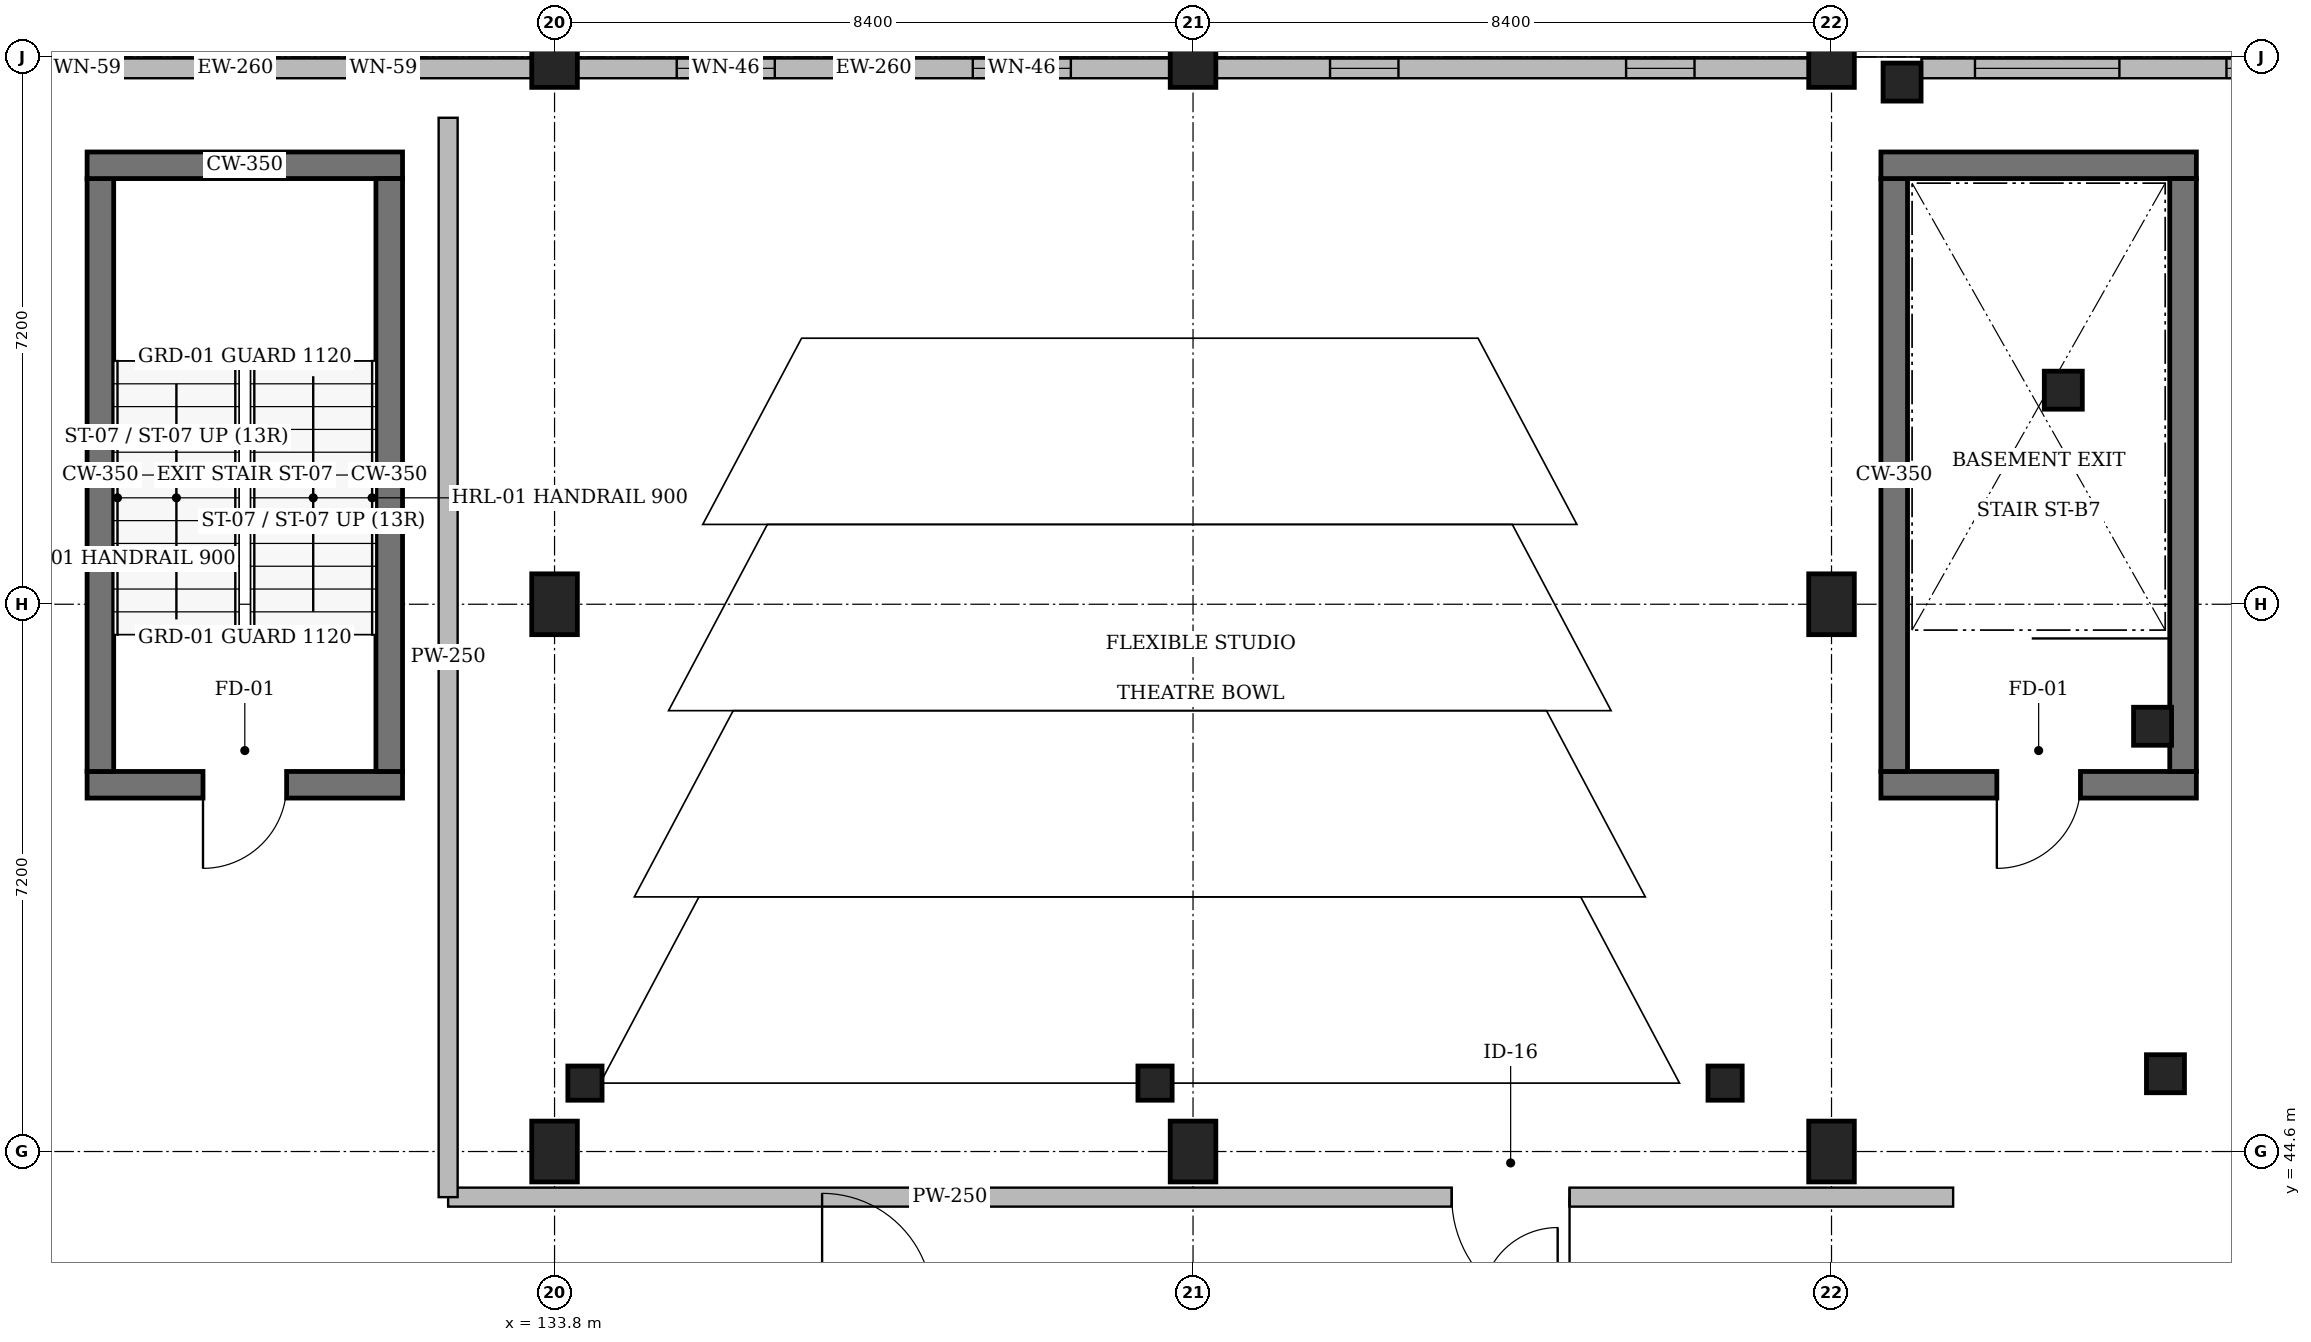
"""IFC4 building model, lengths in metres.
Left out: names, types, materials, properties, quantities, classifications, styles, units other than length and angle.
Written with IfcOpenShell. Run it as: python <this file> out.ifc"""

import sys

from ifc_helpers import new_model, si_unit, direction, frame, frame_2d, origin, origin_2d, place, context, subcontext, project, spatial, rectangle, extrude, element, fill, save


model = new_model("IFC4")
c1 = context("Model", 3, precision=1e-05, world=origin(), true_north=direction((0.0, 1.0)))
c2 = subcontext(c1, "Body", "Model", "MODEL_VIEW")
j1 = project(units=[si_unit("LENGTHUNIT", "METRE"), si_unit("PLANEANGLEUNIT", "RADIAN")], contexts=[c1])
p1 = place(None, origin())
s1 = spatial("IfcSite", under=j1, at=p1, CompositionType="ELEMENT")
p2 = place(p1, origin())
s2 = spatial("IfcBuilding", under=s1, at=p2, CompositionType="ELEMENT")
p3 = place(p2, origin())
s3 = spatial("IfcBuildingStorey", under=s2, at=p3, CompositionType="ELEMENT", Elevation=0.0)
for number, where, z_axis, x_axis in (
    (1, (133.8, 44.6, 0.0), (0.0, 0.0, 1.0), (1.0, 0.0, 0.0)),
    (2, (133.8, 51.8, 0.0), (0.0, 0.0, 1.0), (1.0, 0.0, 0.0)),
    (3, (133.8, 59.0, 0.0), (0.0, 0.0, 1.0), (1.0, 0.0, 0.0)),
    (4, (142.2, 44.6, 0.0), (0.0, 0.0, 1.0), (1.0, 0.0, 0.0)),
    (5, (142.2, 59.0, 0.0), (0.0, 0.0, 1.0), (1.0, 0.0, 0.0)),
    (6, (150.6, 44.6, 0.0), (0.0, 0.0, 1.0), (1.0, 0.0, 0.0)),
    (7, (150.6, 51.8, 0.0), (0.0, 0.0, 1.0), (1.0, 0.0, 0.0)),
    (8, (150.6, 59.0, 0.0), (0.0, 0.0, 1.0), (1.0, 0.0, 0.0)),
):
    element("IfcColumn", number, at=place(p3, frame(where, z_axis=z_axis, x_axis=x_axis)), inside=s3, PredefinedType="COLUMN", context=c2, shape_type="SweptSolid", body=[
        extrude(rectangle(XDim=0.6, YDim=0.8, at=origin_2d()), origin(), (0.0, 0.0, 1.0), 4.8),
    ])
for number, where, z_axis, x_axis in (
    (9, (134.2, 45.5, 0.0), (0.0, 0.0, 1.0), (1.0, 0.0, 0.0)),
    (10, (141.7, 45.5, 0.0), (0.0, 0.0, 1.0), (1.0, 0.0, 0.0)),
    (11, (149.2, 45.5, 0.0), (0.0, 0.0, 1.0), (1.0, 0.0, 0.0)),
):
    element("IfcColumn", number, at=place(p3, frame(where, z_axis=z_axis, x_axis=x_axis)), inside=s3, PredefinedType="COLUMN", context=c2, shape_type="SweptSolid", body=[
        extrude(rectangle(XDim=0.45, YDim=0.45, at=origin_2d()), origin(), (0.0, 0.0, 1.0), 0.7),
    ])
for number, where, z_axis, x_axis in (
    (12, (151.528, 58.669, 0.0), (0.0, 0.0, 1.0), (1.0, 0.0, 0.0)),
    (13, (153.649, 54.616, 0.0), (0.0, 0.0, 1.0), (1.0, 0.0, 0.0)),
    (14, (154.824, 50.195, 0.0), (0.0, 0.0, 1.0), (1.0, 0.0, 0.0)),
    (15, (154.993, 45.623, 0.0), (0.0, 0.0, 1.0), (1.0, 0.0, 0.0)),
):
    element("IfcColumn", number, at=place(p3, frame(where, z_axis=z_axis, x_axis=x_axis)), inside=s3, PredefinedType="COLUMN", context=c2, shape_type="SweptSolid", body=[
        extrude(rectangle(XDim=0.5, YDim=0.5, at=origin_2d()), origin(), (0.0, 0.0, 1.0), 4.8),
    ])
p4 = place(p3, frame((131.8, 49.425, 0.0), z_axis=(0.0, 0.0, 1.0), x_axis=(-1.0, 0.0, 0.0)))
e16 = element("IfcWall", 16, at=p4, inside=s3, PredefinedType="SOLIDWALL", context=c2, shape_type="SweptSolid", body=[
    extrude(rectangle(XDim=4.15, YDim=0.35, at=frame_2d((2.075, 0.0))), origin(), (0.0, 0.0, 1.0), 4.8),
])
p5 = place(p4, frame((1.525, 0.0, 0.0)))
e17 = element("IfcOpeningElement", 17, at=p5, cuts=e16, PredefinedType="OPENING", context=c2, shape_type="SweptSolid", body=[
    extrude(rectangle(XDim=1.1, YDim=2.15, at=frame_2d((0.55, 1.075))), frame((0.0, 0.195, 0.0), z_axis=(0.0, -1.0, 0.0), x_axis=(1.0, 0.0, 0.0)), (0.0, 0.0, 1.0), 0.39),
])
p6 = place(p3, frame((127.825, 49.6, 0.0), z_axis=(0.0, 0.0, 1.0), x_axis=(0.0, 1.0, 0.0)))
e18 = element("IfcWall", 18, at=p6, inside=s3, PredefinedType="SOLIDWALL", context=c2, shape_type="SweptSolid", body=[
    extrude(rectangle(XDim=7.8, YDim=0.35, at=frame_2d((3.9, 0.0))), origin(), (0.0, 0.0, 1.0), 4.8),
])
p7 = place(p3, frame((127.65, 57.575, 0.0), z_axis=(0.0, 0.0, 1.0), x_axis=(1.0, 0.0, 0.0)))
e19 = element("IfcWall", 19, at=p7, inside=s3, PredefinedType="SOLIDWALL", context=c2, shape_type="SweptSolid", body=[
    extrude(rectangle(XDim=4.15, YDim=0.35, at=frame_2d((2.075, 0.0))), origin(), (0.0, 0.0, 1.0), 4.8),
])
p8 = place(p3, frame((131.625, 57.4, 0.0), z_axis=(0.0, 0.0, 1.0), x_axis=(0.0, -1.0, 0.0)))
e20 = element("IfcWall", 20, at=p8, inside=s3, PredefinedType="SOLIDWALL", context=c2, shape_type="SweptSolid", body=[
    extrude(rectangle(XDim=7.8, YDim=0.35, at=frame_2d((3.9, 0.0))), origin(), (0.0, 0.0, 1.0), 4.8),
])
p9 = place(p3, frame((155.4, 49.425, 0.0), z_axis=(0.0, 0.0, 1.0), x_axis=(-1.0, 0.0, 0.0)))
e21 = element("IfcWall", 21, at=p9, inside=s3, PredefinedType="SOLIDWALL", context=c2, shape_type="SweptSolid", body=[
    extrude(rectangle(XDim=4.15, YDim=0.35, at=frame_2d((2.075, 0.0))), origin(), (0.0, 0.0, 1.0), 4.54),
])
p10 = place(p9, frame((1.525, 0.0, 0.0)))
e22 = element("IfcOpeningElement", 22, at=p10, cuts=e21, PredefinedType="OPENING", context=c2, shape_type="SweptSolid", body=[
    extrude(rectangle(XDim=1.1, YDim=2.15, at=frame_2d((0.55, 1.075))), frame((0.0, 0.195, 0.0), z_axis=(0.0, -1.0, 0.0), x_axis=(1.0, 0.0, 0.0)), (0.0, 0.0, 1.0), 0.39),
])
p11 = place(p3, frame((151.425, 49.6, 0.0), z_axis=(0.0, 0.0, 1.0), x_axis=(0.0, 1.0, 0.0)))
e23 = element("IfcWall", 23, at=p11, inside=s3, PredefinedType="SOLIDWALL", context=c2, shape_type="SweptSolid", body=[
    extrude(rectangle(XDim=7.8, YDim=0.35, at=frame_2d((3.9, 0.0))), origin(), (0.0, 0.0, 1.0), 4.54),
])
p12 = place(p3, frame((151.25, 57.575, 0.0), z_axis=(0.0, 0.0, 1.0), x_axis=(1.0, 0.0, 0.0)))
e24 = element("IfcWall", 24, at=p12, inside=s3, PredefinedType="SOLIDWALL", context=c2, shape_type="SweptSolid", body=[
    extrude(rectangle(XDim=4.15, YDim=0.35, at=frame_2d((2.075, 0.0))), origin(), (0.0, 0.0, 1.0), 4.54),
])
p13 = place(p3, frame((155.225, 57.4, 0.0), z_axis=(0.0, 0.0, 1.0), x_axis=(0.0, -1.0, 0.0)))
e25 = element("IfcWall", 25, at=p13, inside=s3, PredefinedType="SOLIDWALL", context=c2, shape_type="SweptSolid", body=[
    extrude(rectangle(XDim=7.8, YDim=0.35, at=frame_2d((3.9, 0.0))), origin(), (0.0, 0.0, 1.0), 4.54),
])
p14 = place(p3, frame((125.705, 58.85, 0.0), z_axis=(0.0, 0.0, 1.0), x_axis=(1.0, 0.0, 0.0)))
e26 = element("IfcWall", 26, at=p14, inside=s3, PredefinedType="SOLIDWALL", context=c2, shape_type="SweptSolid", body=[
    extrude(rectangle(XDim=7.79, YDim=0.26, at=frame_2d((3.895, 0.0))), origin(), (0.0, 0.0, 1.0), 3.873),
])
p15 = place(p14, frame((1.482, 0.0, 0.95)))
e27 = element("IfcOpeningElement", 27, at=p15, cuts=e26, PredefinedType="OPENING", context=c2, shape_type="SweptSolid", body=[
    extrude(rectangle(XDim=0.93, YDim=1.8, at=frame_2d((0.465, 0.9))), frame((0.0, 0.15, 0.0), z_axis=(0.0, -1.0, 0.0), x_axis=(1.0, 0.0, 0.0)), (0.0, 0.0, 1.0), 0.3),
])
p16 = place(p14, frame((5.377, 0.0, 0.95)))
e28 = element("IfcOpeningElement", 28, at=p16, cuts=e26, PredefinedType="OPENING", context=c2, shape_type="SweptSolid", body=[
    extrude(rectangle(XDim=0.93, YDim=1.8, at=frame_2d((0.465, 0.9))), frame((0.0, 0.15, 0.0), z_axis=(0.0, -1.0, 0.0), x_axis=(1.0, 0.0, 0.0)), (0.0, 0.0, 1.0), 0.3),
])
p17 = place(p3, frame((134.105, 58.85, 0.0), z_axis=(0.0, 0.0, 1.0), x_axis=(1.0, 0.0, 0.0)))
e29 = element("IfcWall", 29, at=p17, inside=s3, PredefinedType="SOLIDWALL", context=c2, shape_type="SweptSolid", body=[
    extrude(rectangle(XDim=7.79, YDim=0.26, at=frame_2d((3.895, 0.0))), origin(), (0.0, 0.0, 1.0), 3.873),
])
p18 = place(p17, frame((1.302, 0.0, 0.95)))
e30 = element("IfcOpeningElement", 30, at=p18, cuts=e29, PredefinedType="OPENING", context=c2, shape_type="SweptSolid", body=[
    extrude(rectangle(XDim=1.29, YDim=1.65, at=frame_2d((0.645, 0.825))), frame((0.0, 0.15, 0.0), z_axis=(0.0, -1.0, 0.0), x_axis=(1.0, 0.0, 0.0)), (0.0, 0.0, 1.0), 0.3),
])
p19 = place(p17, frame((5.198, 0.0, 0.95)))
e31 = element("IfcOpeningElement", 31, at=p19, cuts=e29, PredefinedType="OPENING", context=c2, shape_type="SweptSolid", body=[
    extrude(rectangle(XDim=1.29, YDim=1.65, at=frame_2d((0.645, 0.825))), frame((0.0, 0.15, 0.0), z_axis=(0.0, -1.0, 0.0), x_axis=(1.0, 0.0, 0.0)), (0.0, 0.0, 1.0), 0.3),
])
p20 = place(p3, frame((142.505, 58.85, 0.0), z_axis=(0.0, 0.0, 1.0), x_axis=(1.0, 0.0, 0.0)))
e32 = element("IfcWall", 32, at=p20, inside=s3, PredefinedType="SOLIDWALL", context=c2, shape_type="SweptSolid", body=[
    extrude(rectangle(XDim=7.79, YDim=0.26, at=frame_2d((3.895, 0.0))), origin(), (0.0, 0.0, 1.0), 3.873),
])
p21 = place(p20, frame((1.498, 0.0, 0.95)))
e33 = element("IfcOpeningElement", 33, at=p21, cuts=e32, PredefinedType="OPENING", context=c2, shape_type="SweptSolid", body=[
    extrude(rectangle(XDim=0.9, YDim=1.55, at=frame_2d((0.45, 0.775))), frame((0.0, 0.15, 0.0), z_axis=(0.0, -1.0, 0.0), x_axis=(1.0, 0.0, 0.0)), (0.0, 0.0, 1.0), 0.3),
])
p22 = place(p20, frame((5.393, 0.0, 0.95)))
e34 = element("IfcOpeningElement", 34, at=p22, cuts=e32, PredefinedType="OPENING", context=c2, shape_type="SweptSolid", body=[
    extrude(rectangle(XDim=0.9, YDim=1.55, at=frame_2d((0.45, 0.775))), frame((0.0, 0.15, 0.0), z_axis=(0.0, -1.0, 0.0), x_axis=(1.0, 0.0, 0.0)), (0.0, 0.0, 1.0), 0.3),
])
p23 = place(p3, frame((151.783, 58.85, 0.0), z_axis=(0.0, 0.0, 1.0), x_axis=(1.0, 0.0, 0.0)))
e35 = element("IfcWall", 35, at=p23, inside=s3, PredefinedType="SOLIDWALL", context=c2, shape_type="SweptSolid", body=[
    extrude(rectangle(XDim=6.617, YDim=0.26, at=frame_2d((3.308, 0.0))), origin(), (0.0, 0.0, 1.0), 4.54),
])
p24 = place(p23, frame((0.704, 0.0, 0.95)))
e36 = element("IfcOpeningElement", 36, at=p24, cuts=e35, PredefinedType="OPENING", context=c2, shape_type="SweptSolid", body=[
    extrude(rectangle(XDim=1.9, YDim=1.6, at=frame_2d((0.95, 0.8))), frame((0.0, 0.15, 0.0), z_axis=(0.0, -1.0, 0.0), x_axis=(1.0, 0.0, 0.0)), (0.0, 0.0, 1.0), 0.3),
])
p25 = place(p23, frame((4.013, 0.0, 0.95)))
e37 = element("IfcOpeningElement", 37, at=p25, cuts=e35, PredefinedType="OPENING", context=c2, shape_type="SweptSolid", body=[
    extrude(rectangle(XDim=1.9, YDim=1.6, at=frame_2d((0.95, 0.8))), frame((0.0, 0.15, 0.0), z_axis=(0.0, -1.0, 0.0), x_axis=(1.0, 0.0, 0.0)), (0.0, 0.0, 1.0), 0.3),
])
p26 = place(p3, frame((152.2, 44.0, 0.0), z_axis=(0.0, 0.0, 1.0), x_axis=(-1.0, 0.0, 0.0)))
e38 = element("IfcWall", 38, at=p26, inside=s3, PredefinedType="PARTITIONING", context=c2, shape_type="SweptSolid", body=[
    extrude(rectangle(XDim=19.8, YDim=0.25, at=frame_2d((9.9, 0.0))), origin(), (0.0, 0.0, 1.0), 4.54),
])
p27 = place(p26, frame((5.046, 0.0, 0.0)))
e39 = element("IfcOpeningElement", 39, at=p27, cuts=e38, PredefinedType="OPENING", context=c2, shape_type="SweptSolid", body=[
    extrude(rectangle(XDim=1.55, YDim=2.2, at=frame_2d((0.775, 1.1))), frame((0.0, 0.145, 0.0), z_axis=(0.0, -1.0, 0.0), x_axis=(1.0, 0.0, 0.0)), (0.0, 0.0, 1.0), 0.29),
])
p28 = place(p3, frame((132.4, 44.0, 0.0), z_axis=(0.0, 0.0, 1.0), x_axis=(0.0, 1.0, 0.0)))
e40 = element("IfcWall", 40, at=p28, inside=s3, PredefinedType="PARTITIONING", context=c2, shape_type="SweptSolid", body=[
    extrude(rectangle(XDim=14.2, YDim=0.25, at=frame_2d((7.1, 0.0))), origin(), (0.0, 0.0, 1.0), 4.54),
])
p29 = place(p5, origin())
e41 = element("IfcDoor", 41, at=p29, inside=s3, OperationType="SINGLE_SWING_RIGHT", PredefinedType="DOOR", context=c2, shape_type="SweptSolid", body=[
    extrude(rectangle(XDim=1.1, YDim=2.15, at=frame_2d((0.55, 1.075))), frame((0.0, 0.025, 0.0), z_axis=(0.0, -1.0, 0.0), x_axis=(1.0, 0.0, 0.0)), (0.0, 0.0, 1.0), 0.05),
])
fill(e17, e41)
p30 = place(p10, origin())
e42 = element("IfcDoor", 42, at=p30, inside=s3, OperationType="SINGLE_SWING_RIGHT", PredefinedType="DOOR", context=c2, shape_type="SweptSolid", body=[
    extrude(rectangle(XDim=1.1, YDim=2.15, at=frame_2d((0.55, 1.075))), frame((0.0, 0.025, 0.0), z_axis=(0.0, -1.0, 0.0), x_axis=(1.0, 0.0, 0.0)), (0.0, 0.0, 1.0), 0.05),
])
fill(e22, e42)
p31 = place(p15, origin())
e43 = element("IfcWindow", 43, at=p31, inside=s3, PartitioningType="SINGLE_PANEL", PredefinedType="WINDOW", context=c2, shape_type="SweptSolid", body=[
    extrude(rectangle(XDim=0.93, YDim=1.8, at=frame_2d((0.465, 0.9))), frame((0.0, 0.03, 0.0), z_axis=(0.0, -1.0, 0.0), x_axis=(1.0, 0.0, 0.0)), (0.0, 0.0, 1.0), 0.06),
])
fill(e27, e43)
p32 = place(p16, origin())
e44 = element("IfcWindow", 44, at=p32, inside=s3, PartitioningType="SINGLE_PANEL", PredefinedType="WINDOW", context=c2, shape_type="SweptSolid", body=[
    extrude(rectangle(XDim=0.93, YDim=1.8, at=frame_2d((0.465, 0.9))), frame((0.0, 0.03, 0.0), z_axis=(0.0, -1.0, 0.0), x_axis=(1.0, 0.0, 0.0)), (0.0, 0.0, 1.0), 0.06),
])
fill(e28, e44)
p33 = place(p18, origin())
e45 = element("IfcWindow", 45, at=p33, inside=s3, PartitioningType="SINGLE_PANEL", PredefinedType="WINDOW", context=c2, shape_type="SweptSolid", body=[
    extrude(rectangle(XDim=1.29, YDim=1.65, at=frame_2d((0.645, 0.825))), frame((0.0, 0.03, 0.0), z_axis=(0.0, -1.0, 0.0), x_axis=(1.0, 0.0, 0.0)), (0.0, 0.0, 1.0), 0.06),
])
fill(e30, e45)
p34 = place(p19, origin())
e46 = element("IfcWindow", 46, at=p34, inside=s3, PartitioningType="SINGLE_PANEL", PredefinedType="WINDOW", context=c2, shape_type="SweptSolid", body=[
    extrude(rectangle(XDim=1.29, YDim=1.65, at=frame_2d((0.645, 0.825))), frame((0.0, 0.03, 0.0), z_axis=(0.0, -1.0, 0.0), x_axis=(1.0, 0.0, 0.0)), (0.0, 0.0, 1.0), 0.06),
])
fill(e31, e46)
p35 = place(p21, origin())
e47 = element("IfcWindow", 47, at=p35, inside=s3, PartitioningType="SINGLE_PANEL", PredefinedType="WINDOW", context=c2, shape_type="SweptSolid", body=[
    extrude(rectangle(XDim=0.9, YDim=1.55, at=frame_2d((0.45, 0.775))), frame((0.0, 0.03, 0.0), z_axis=(0.0, -1.0, 0.0), x_axis=(1.0, 0.0, 0.0)), (0.0, 0.0, 1.0), 0.06),
])
fill(e33, e47)
p36 = place(p22, origin())
e48 = element("IfcWindow", 48, at=p36, inside=s3, PartitioningType="SINGLE_PANEL", PredefinedType="WINDOW", context=c2, shape_type="SweptSolid", body=[
    extrude(rectangle(XDim=0.9, YDim=1.55, at=frame_2d((0.45, 0.775))), frame((0.0, 0.03, 0.0), z_axis=(0.0, -1.0, 0.0), x_axis=(1.0, 0.0, 0.0)), (0.0, 0.0, 1.0), 0.06),
])
fill(e34, e48)
p37 = place(p24, origin())
e49 = element("IfcWindow", 49, at=p37, inside=s3, PartitioningType="SINGLE_PANEL", PredefinedType="WINDOW", context=c2, shape_type="SweptSolid", body=[
    extrude(rectangle(XDim=1.9, YDim=1.6, at=frame_2d((0.95, 0.8))), frame((0.0, 0.03, 0.0), z_axis=(0.0, -1.0, 0.0), x_axis=(1.0, 0.0, 0.0)), (0.0, 0.0, 1.0), 0.06),
])
fill(e36, e49)
p38 = place(p25, origin())
e50 = element("IfcWindow", 50, at=p38, inside=s3, PartitioningType="SINGLE_PANEL", PredefinedType="WINDOW", context=c2, shape_type="SweptSolid", body=[
    extrude(rectangle(XDim=1.9, YDim=1.6, at=frame_2d((0.95, 0.8))), frame((0.0, 0.03, 0.0), z_axis=(0.0, -1.0, 0.0), x_axis=(1.0, 0.0, 0.0)), (0.0, 0.0, 1.0), 0.06),
])
fill(e37, e50)
p39 = place(p27, origin())
e51 = element("IfcDoor", 51, at=p39, inside=s3, OperationType="DOUBLE_DOOR_SINGLE_SWING", PredefinedType="DOOR", context=c2, shape_type="SweptSolid", body=[
    extrude(rectangle(XDim=1.55, YDim=2.2, at=frame_2d((0.775, 1.1))), frame((0.0, 0.025, 0.0), z_axis=(0.0, -1.0, 0.0), x_axis=(1.0, 0.0, 0.0)), (0.0, 0.0, 1.0), 0.05),
])
fill(e39, e51)
save(model, sys.argv[1])
